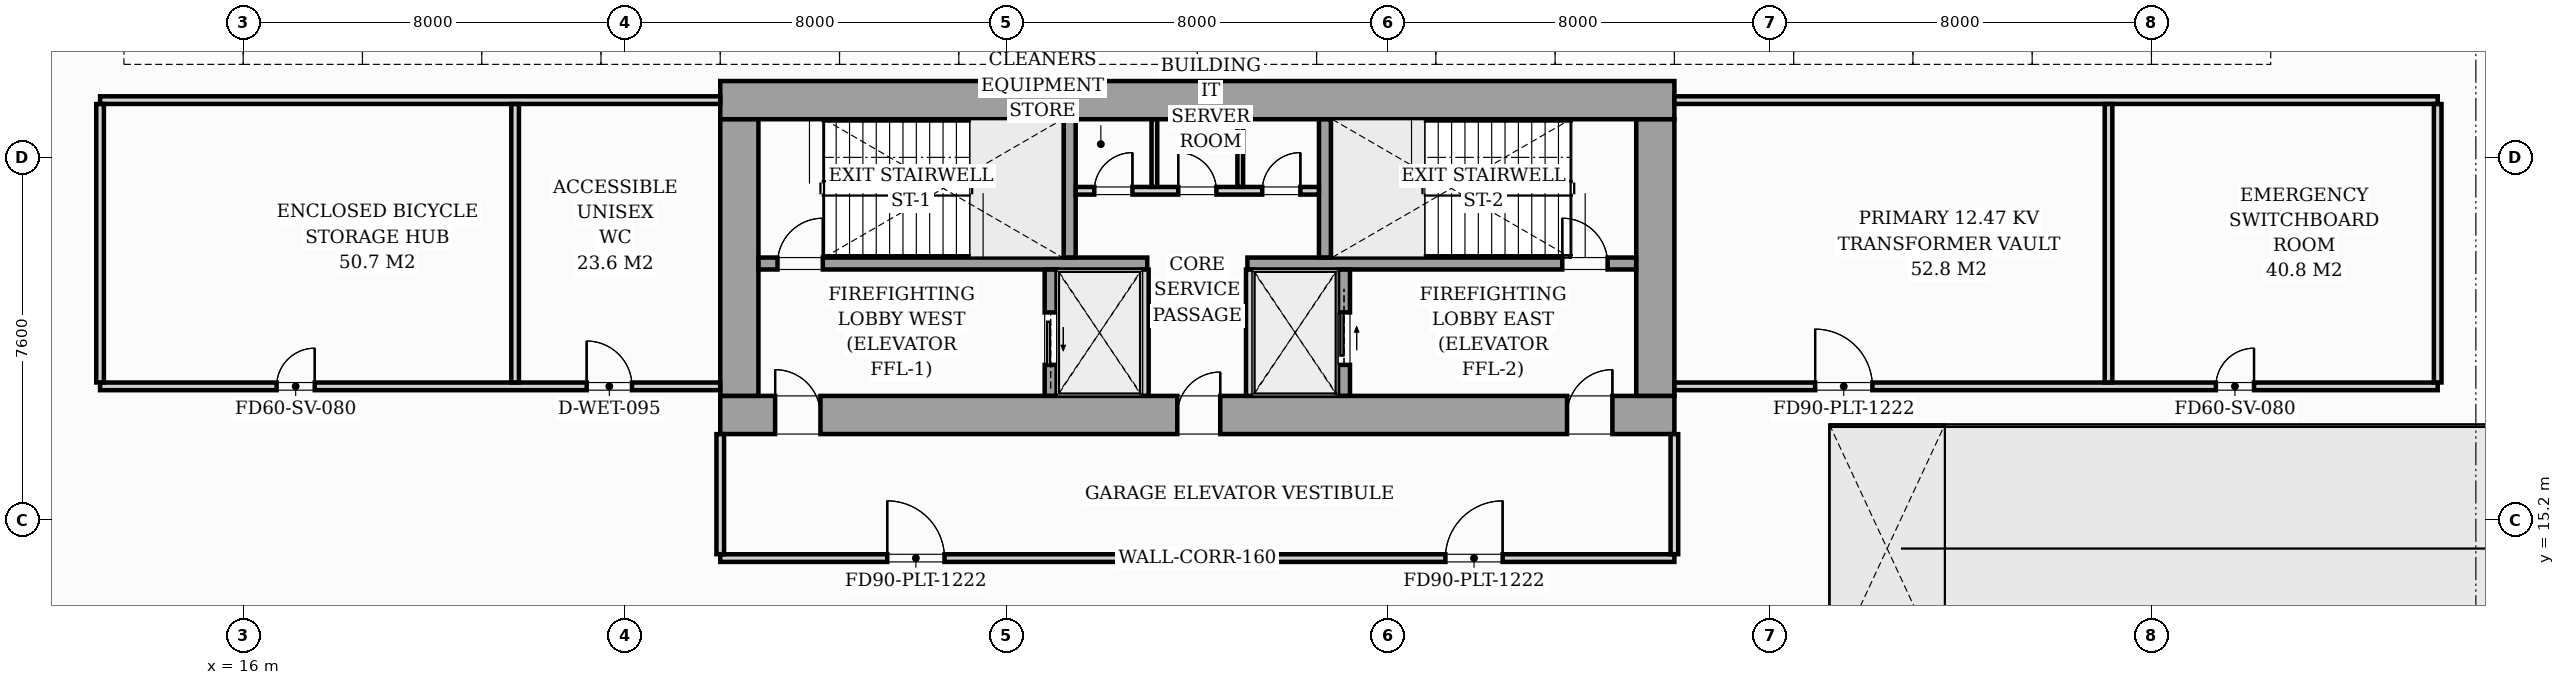
"""IFC4 building model, lengths in metres.
Left out: names, types, materials, properties, quantities, classifications, styles, units other than length and angle.
Written with IfcOpenShell. Run it as: python <this file> out.ifc"""

import sys

from ifc_helpers import new_model, si_unit, direction, frame, frame_2d, origin, origin_2d, place, context, subcontext, project, spatial, rectangle, i_section, extrude, source, transform, mapped, element, fill, save


model = new_model("IFC4")
c1 = context("Model", 3, precision=1e-05, world=origin(), true_north=direction((0.0, 1.0)))
c2 = subcontext(c1, "Body", "Model", "MODEL_VIEW")
j1 = project(units=[si_unit("LENGTHUNIT", "METRE"), si_unit("PLANEANGLEUNIT", "RADIAN")], contexts=[c1])
p1 = place(None, origin())
s1 = spatial("IfcSite", under=j1, at=p1, CompositionType="ELEMENT")
p2 = place(p1, origin())
s2 = spatial("IfcBuilding", under=s1, at=p2, CompositionType="ELEMENT")
p3 = place(p2, frame((0.0, 0.0, -4.2)))
s3 = spatial("IfcBuildingStorey", under=s2, at=p3, CompositionType="ELEMENT", Elevation=-4.2)
m1 = source(origin(), c2, "Body", "SweptSolid", [
    extrude(i_section(OverallWidth=0.437, OverallDepth=0.514, WebThickness=0.061, FlangeThickness=0.097, FilletRadius=0.018, at=origin_2d()), origin(), (0.0, 0.0, 1.0), 4.196),
])
for number, where, z_axis, x_axis in (
    (1, (26.4, 17.4, 0.002), (0.0, 0.0, 1.0), (1.0, 0.0, 0.0)),
    (2, (33.12, 17.4, 0.002), (0.0, 0.0, 1.0), (1.0, 0.0, 0.0)),
    (3, (38.88, 17.4, 0.002), (0.0, 0.0, 1.0), (1.0, 0.0, 0.0)),
    (4, (45.6, 17.4, 0.002), (0.0, 0.0, 1.0), (1.0, 0.0, 0.0)),
    (5, (26.4, 24.0, 0.002), (0.0, 0.0, 1.0), (1.0, 0.0, 0.0)),
    (6, (33.12, 24.0, 0.002), (0.0, 0.0, 1.0), (1.0, 0.0, 0.0)),
    (7, (38.88, 24.0, 0.002), (0.0, 0.0, 1.0), (1.0, 0.0, 0.0)),
    (8, (45.6, 24.0, 0.002), (0.0, 0.0, 1.0), (1.0, 0.0, 0.0)),
):
    element("IfcColumn", number, at=place(p3, frame(where, z_axis=z_axis, x_axis=x_axis)), inside=s3, PredefinedType="PILASTER", context=c2, shape_type="MappedRepresentation", body=[
        mapped(m1, transform((0.0, 0.0, 0.0), scale=1.0)),
    ])
p4 = place(p3, frame((26.0, 17.4, 0.0), z_axis=(0.0, 0.0, 1.0), x_axis=(1.0, 0.0, 0.0)))
e9 = element("IfcWall", 9, at=p4, inside=s3, PredefinedType="SHEAR", context=c2, shape_type="SweptSolid", body=[
    extrude(rectangle(XDim=20.0, YDim=0.8, at=frame_2d((10.0, 0.0))), origin(), (0.0, 0.0, 1.0), 4.2),
])
p5 = place(p4, frame((1.15, 0.0, 0.0)))
e10 = element("IfcOpeningElement", 10, at=p5, cuts=e9, PredefinedType="OPENING", context=c2, shape_type="SweptSolid", body=[
    extrude(rectangle(XDim=0.95, YDim=2.06, at=frame_2d((0.475, 1.03))), frame((0.0, 0.41, 0.0), z_axis=(0.0, -1.0, 0.0), x_axis=(1.0, 0.0, 0.0)), (0.0, 0.0, 1.0), 0.82),
])
p6 = place(p4, frame((9.58, 0.0, 0.0)))
e11 = element("IfcOpeningElement", 11, at=p6, cuts=e9, PredefinedType="OPENING", context=c2, shape_type="SweptSolid", body=[
    extrude(rectangle(XDim=0.9, YDim=2.06, at=frame_2d((0.45, 1.03))), frame((0.0, 0.41, 0.0), z_axis=(0.0, -1.0, 0.0), x_axis=(1.0, 0.0, 0.0)), (0.0, 0.0, 1.0), 0.82),
])
p7 = place(p4, frame((17.75, 0.0, 0.0)))
e12 = element("IfcOpeningElement", 12, at=p7, cuts=e9, PredefinedType="OPENING", context=c2, shape_type="SweptSolid", body=[
    extrude(rectangle(XDim=0.95, YDim=2.06, at=frame_2d((0.475, 1.03))), frame((0.0, 0.41, 0.0), z_axis=(0.0, -1.0, 0.0), x_axis=(1.0, 0.0, 0.0)), (0.0, 0.0, 1.0), 0.82),
])
p8 = place(p3, frame((26.0, 24.0, 0.0), z_axis=(0.0, 0.0, 1.0), x_axis=(1.0, 0.0, 0.0)))
e13 = element("IfcWall", 13, at=p8, inside=s3, PredefinedType="SHEAR", context=c2, shape_type="SweptSolid", body=[
    extrude(rectangle(XDim=20.0, YDim=0.8, at=frame_2d((10.0, 0.0))), origin(), (0.0, 0.0, 1.0), 4.2),
])
for number, where, z_axis, x_axis in (
    (14, (26.4, 17.802, 0.0), (0.0, 0.0, 1.0), (0.0, 1.0, 0.0)),
    (15, (45.6, 17.802, 0.0), (0.0, 0.0, 1.0), (0.0, 1.0, 0.0)),
):
    element("IfcWall", number, at=place(p3, frame(where, z_axis=z_axis, x_axis=x_axis)), inside=s3, PredefinedType="SHEAR", context=c2, shape_type="SweptSolid", body=[
        extrude(rectangle(XDim=5.796, YDim=0.8, at=frame_2d((2.898, 0.0))), origin(), (0.0, 0.0, 1.0), 4.2),
    ])
p9 = place(p3, frame((26.802, 20.575, 0.0), z_axis=(0.0, 0.0, 1.0), x_axis=(1.0, 0.0, 0.0)))
e16 = element("IfcWall", 16, at=p9, inside=s3, PredefinedType="SOLIDWALL", context=c2, shape_type="SweptSolid", body=[
    extrude(rectangle(XDim=8.148, YDim=0.25, at=frame_2d((4.074, 0.0))), origin(), (0.0, 0.0, 1.0), 4.2),
])
p10 = place(p9, frame((0.398, 0.0, 0.0)))
e17 = element("IfcOpeningElement", 17, at=p10, cuts=e16, PredefinedType="OPENING", context=c2, shape_type="SweptSolid", body=[
    extrude(rectangle(XDim=0.95, YDim=2.06, at=frame_2d((0.475, 1.03))), frame((0.0, 0.135, 0.0), z_axis=(0.0, -1.0, 0.0), x_axis=(1.0, 0.0, 0.0)), (0.0, 0.0, 1.0), 0.27),
])
p11 = place(p3, frame((37.05, 20.575, 0.0), z_axis=(0.0, 0.0, 1.0), x_axis=(1.0, 0.0, 0.0)))
e18 = element("IfcWall", 18, at=p11, inside=s3, PredefinedType="SOLIDWALL", context=c2, shape_type="SweptSolid", body=[
    extrude(rectangle(XDim=8.148, YDim=0.25, at=frame_2d((4.074, 0.0))), origin(), (0.0, 0.0, 1.0), 4.2),
])
p12 = place(p11, frame((6.6, 0.0, 0.0)))
e19 = element("IfcOpeningElement", 19, at=p12, cuts=e18, PredefinedType="OPENING", context=c2, shape_type="SweptSolid", body=[
    extrude(rectangle(XDim=0.95, YDim=2.06, at=frame_2d((0.475, 1.03))), frame((0.0, 0.135, 0.0), z_axis=(0.0, -1.0, 0.0), x_axis=(1.0, 0.0, 0.0)), (0.0, 0.0, 1.0), 0.27),
])
for number, where, z_axis, x_axis in (
    (20, (33.325, 20.702, 0.0), (0.0, 0.0, 1.0), (0.0, 1.0, 0.0)),
    (21, (38.675, 20.702, 0.0), (0.0, 0.0, 1.0), (0.0, 1.0, 0.0)),
):
    element("IfcWall", number, at=place(p3, frame(where, z_axis=z_axis, x_axis=x_axis)), inside=s3, PredefinedType="SOLIDWALL", context=c2, shape_type="SweptSolid", body=[
        extrude(rectangle(XDim=2.896, YDim=0.25, at=frame_2d((1.448, 0.0))), origin(), (0.0, 0.0, 1.0), 4.2),
    ])
p13 = place(p3, frame((32.925, 17.802, 0.0), z_axis=(0.0, 0.0, 1.0), x_axis=(0.0, 1.0, 0.0)))
e22 = element("IfcWall", 22, at=p13, inside=s3, PredefinedType="SOLIDWALL", context=c2, shape_type="SweptSolid", body=[
    extrude(rectangle(XDim=2.646, YDim=0.25, at=frame_2d((1.323, 0.0))), origin(), (0.0, 0.0, 1.0), 4.2),
])
p14 = place(p13, frame((0.648, 0.0, 0.0)))
e23 = element("IfcOpeningElement", 23, at=p14, cuts=e22, PredefinedType="OPENING", context=c2, shape_type="SweptSolid", body=[
    extrude(rectangle(XDim=1.1, YDim=2.08, at=frame_2d((0.55, 1.04))), frame((0.0, 0.135, 0.0), z_axis=(0.0, -1.0, 0.0), x_axis=(1.0, 0.0, 0.0)), (0.0, 0.0, 1.0), 0.27),
])
for number, where, z_axis, x_axis in (
    (24, (34.9, 17.802, 0.0), (0.0, 0.0, 1.0), (0.0, 1.0, 0.0)),
    (25, (37.1, 17.802, 0.0), (0.0, 0.0, 1.0), (0.0, 1.0, 0.0)),
):
    element("IfcWall", number, at=place(p3, frame(where, z_axis=z_axis, x_axis=x_axis)), inside=s3, PredefinedType="PARTITIONING", context=c2, shape_type="SweptSolid", body=[
        extrude(rectangle(XDim=2.646, YDim=0.16, at=frame_2d((1.323, 0.0))), origin(), (0.0, 0.0, 1.0), 3.9),
    ])
p15 = place(p3, frame((39.075, 17.802, 0.0), z_axis=(0.0, 0.0, 1.0), x_axis=(0.0, 1.0, 0.0)))
e26 = element("IfcWall", 26, at=p15, inside=s3, PredefinedType="SOLIDWALL", context=c2, shape_type="SweptSolid", body=[
    extrude(rectangle(XDim=2.646, YDim=0.25, at=frame_2d((1.323, 0.0))), origin(), (0.0, 0.0, 1.0), 4.2),
])
p16 = place(p15, frame((0.648, 0.0, 0.0)))
e27 = element("IfcOpeningElement", 27, at=p16, cuts=e26, PredefinedType="OPENING", context=c2, shape_type="SweptSolid", body=[
    extrude(rectangle(XDim=1.1, YDim=2.08, at=frame_2d((0.55, 1.04))), frame((0.0, 0.135, 0.0), z_axis=(0.0, -1.0, 0.0), x_axis=(1.0, 0.0, 0.0)), (0.0, 0.0, 1.0), 0.27),
])
p17 = place(p3, frame((33.452, 22.1, 0.0), z_axis=(0.0, 0.0, 1.0), x_axis=(1.0, 0.0, 0.0)))
e28 = element("IfcWall", 28, at=p17, inside=s3, PredefinedType="PARTITIONING", context=c2, shape_type="SweptSolid", body=[
    extrude(rectangle(XDim=5.096, YDim=0.16, at=frame_2d((2.548, 0.0))), origin(), (0.0, 0.0, 1.0), 3.9),
])
p18 = place(p17, frame((0.388, 0.0, 0.0)))
e29 = element("IfcOpeningElement", 29, at=p18, cuts=e28, PredefinedType="OPENING", context=c2, shape_type="SweptSolid", body=[
    extrude(rectangle(XDim=0.8, YDim=2.05, at=frame_2d((0.4, 1.025))), frame((0.0, 0.09, 0.0), z_axis=(0.0, -1.0, 0.0), x_axis=(1.0, 0.0, 0.0)), (0.0, 0.0, 1.0), 0.18),
])
p19 = place(p17, frame((2.148, 0.0, 0.0)))
e30 = element("IfcOpeningElement", 30, at=p19, cuts=e28, PredefinedType="OPENING", context=c2, shape_type="SweptSolid", body=[
    extrude(rectangle(XDim=0.8, YDim=2.05, at=frame_2d((0.4, 1.025))), frame((0.0, 0.09, 0.0), z_axis=(0.0, -1.0, 0.0), x_axis=(1.0, 0.0, 0.0)), (0.0, 0.0, 1.0), 0.18),
])
p20 = place(p17, frame((3.908, 0.0, 0.0)))
e31 = element("IfcOpeningElement", 31, at=p20, cuts=e28, PredefinedType="OPENING", context=c2, shape_type="SweptSolid", body=[
    extrude(rectangle(XDim=0.8, YDim=2.05, at=frame_2d((0.4, 1.025))), frame((0.0, 0.09, 0.0), z_axis=(0.0, -1.0, 0.0), x_axis=(1.0, 0.0, 0.0)), (0.0, 0.0, 1.0), 0.18),
])
for number, where, z_axis, x_axis in (
    (32, (35.1, 22.182, 0.0), (0.0, 0.0, 1.0), (0.0, 1.0, 0.0)),
    (33, (36.9, 22.182, 0.0), (0.0, 0.0, 1.0), (0.0, 1.0, 0.0)),
):
    element("IfcWall", number, at=place(p3, frame(where, z_axis=z_axis, x_axis=x_axis)), inside=s3, PredefinedType="PARTITIONING", context=c2, shape_type="SweptSolid", body=[
        extrude(rectangle(XDim=1.416, YDim=0.12, at=frame_2d((0.708, 0.0))), origin(), (0.0, 0.0, 1.0), 3.9),
    ])
p21 = place(p3, frame((26.0, 14.4, 0.0), z_axis=(0.0, 0.0, 1.0), x_axis=(1.0, 0.0, 0.0)))
e34 = element("IfcWall", 34, at=p21, inside=s3, PredefinedType="PARTITIONING", context=c2, shape_type="SweptSolid", body=[
    extrude(rectangle(XDim=20.0, YDim=0.16, at=frame_2d((10.0, 0.0))), origin(), (0.0, 0.0, 1.0), 3.9),
])
p22 = place(p21, frame((3.5, 0.0, 0.0)))
e35 = element("IfcOpeningElement", 35, at=p22, cuts=e34, PredefinedType="OPENING", context=c2, shape_type="SweptSolid", body=[
    extrude(rectangle(XDim=1.2, YDim=2.08, at=frame_2d((0.6, 1.04))), frame((0.0, 0.09, 0.0), z_axis=(0.0, -1.0, 0.0), x_axis=(1.0, 0.0, 0.0)), (0.0, 0.0, 1.0), 0.18),
])
p23 = place(p21, frame((15.2, 0.0, 0.0)))
e36 = element("IfcOpeningElement", 36, at=p23, cuts=e34, PredefinedType="OPENING", context=c2, shape_type="SweptSolid", body=[
    extrude(rectangle(XDim=1.2, YDim=2.08, at=frame_2d((0.6, 1.04))), frame((0.0, 0.09, 0.0), z_axis=(0.0, -1.0, 0.0), x_axis=(1.0, 0.0, 0.0)), (0.0, 0.0, 1.0), 0.18),
])
for number, where, z_axis, x_axis in (
    (37, (26.0, 14.482, 0.0), (0.0, 0.0, 1.0), (0.0, 1.0, 0.0)),
    (38, (46.0, 14.482, 0.0), (0.0, 0.0, 1.0), (0.0, 1.0, 0.0)),
):
    element("IfcWall", number, at=place(p3, frame(where, z_axis=z_axis, x_axis=x_axis)), inside=s3, PredefinedType="PARTITIONING", context=c2, shape_type="SweptSolid", body=[
        extrude(rectangle(XDim=2.516, YDim=0.16, at=frame_2d((1.258, 0.0))), origin(), (0.0, 0.0, 1.0), 3.9),
    ])
p24 = place(p3, frame((13.0, 18.0, 0.0), z_axis=(0.0, 0.0, 1.0), x_axis=(1.0, 0.0, 0.0)))
e39 = element("IfcWall", 39, at=p24, inside=s3, PredefinedType="PARTITIONING", context=c2, shape_type="SweptSolid", body=[
    extrude(rectangle(XDim=12.998, YDim=0.16, at=frame_2d((6.499, 0.0))), origin(), (0.0, 0.0, 1.0), 2.856),
])
p25 = place(p24, frame((10.2, 0.0, 0.0)))
e40 = element("IfcOpeningElement", 40, at=p25, cuts=e39, PredefinedType="OPENING", context=c2, shape_type="SweptSolid", body=[
    extrude(rectangle(XDim=0.95, YDim=2.1, at=frame_2d((0.475, 1.05))), frame((0.0, 0.09, 0.0), z_axis=(0.0, -1.0, 0.0), x_axis=(1.0, 0.0, 0.0)), (0.0, 0.0, 1.0), 0.18),
])
p26 = place(p24, frame((3.7, 0.0, 0.0)))
e41 = element("IfcOpeningElement", 41, at=p26, cuts=e39, PredefinedType="OPENING", context=c2, shape_type="SweptSolid", body=[
    extrude(rectangle(XDim=0.8, YDim=2.05, at=frame_2d((0.4, 1.025))), frame((0.0, 0.09, 0.0), z_axis=(0.0, -1.0, 0.0), x_axis=(1.0, 0.0, 0.0)), (0.0, 0.0, 1.0), 0.18),
])
p27 = place(p3, frame((13.0, 24.0, 0.0), z_axis=(0.0, 0.0, 1.0), x_axis=(1.0, 0.0, 0.0)))
e42 = element("IfcWall", 42, at=p27, inside=s3, PredefinedType="PARTITIONING", context=c2, shape_type="SweptSolid", body=[
    extrude(rectangle(XDim=13.0, YDim=0.16, at=frame_2d((6.5, 0.0))), origin(), (0.0, 0.0, 1.0), 3.9),
])
for number, where, z_axis, x_axis in (
    (43, (13.0, 18.082, 0.0), (0.0, 0.0, 1.0), (0.0, 1.0, 0.0)),
    (44, (21.7, 18.082, 0.0), (0.0, 0.0, 1.0), (0.0, 1.0, 0.0)),
):
    element("IfcWall", number, at=place(p3, frame(where, z_axis=z_axis, x_axis=x_axis)), inside=s3, PredefinedType="PARTITIONING", context=c2, shape_type="SweptSolid", body=[
        extrude(rectangle(XDim=5.836, YDim=0.16, at=frame_2d((2.918, 0.0))), origin(), (0.0, 0.0, 1.0), 3.9),
    ])
p28 = place(p3, frame((46.002, 18.0, 0.0), z_axis=(0.0, 0.0, 1.0), x_axis=(1.0, 0.0, 0.0)))
e45 = element("IfcWall", 45, at=p28, inside=s3, PredefinedType="PARTITIONING", context=c2, shape_type="SweptSolid", body=[
    extrude(rectangle(XDim=15.998, YDim=0.16, at=frame_2d((7.999, 0.0))), origin(), (0.0, 0.0, 1.0), 2.856),
])
p29 = place(p28, frame((2.948, 0.0, 0.0)))
e46 = element("IfcOpeningElement", 46, at=p29, cuts=e45, PredefinedType="OPENING", context=c2, shape_type="SweptSolid", body=[
    extrude(rectangle(XDim=1.2, YDim=2.08, at=frame_2d((0.6, 1.04))), frame((0.0, 0.09, 0.0), z_axis=(0.0, -1.0, 0.0), x_axis=(1.0, 0.0, 0.0)), (0.0, 0.0, 1.0), 0.18),
])
p30 = place(p28, frame((11.348, 0.0, 0.0)))
e47 = element("IfcOpeningElement", 47, at=p30, cuts=e45, PredefinedType="OPENING", context=c2, shape_type="SweptSolid", body=[
    extrude(rectangle(XDim=0.8, YDim=2.05, at=frame_2d((0.4, 1.025))), frame((0.0, 0.09, 0.0), z_axis=(0.0, -1.0, 0.0), x_axis=(1.0, 0.0, 0.0)), (0.0, 0.0, 1.0), 0.18),
])
p31 = place(p3, frame((46.0, 24.0, 0.0), z_axis=(0.0, 0.0, 1.0), x_axis=(1.0, 0.0, 0.0)))
e48 = element("IfcWall", 48, at=p31, inside=s3, PredefinedType="PARTITIONING", context=c2, shape_type="SweptSolid", body=[
    extrude(rectangle(XDim=16.0, YDim=0.16, at=frame_2d((8.0, 0.0))), origin(), (0.0, 0.0, 1.0), 3.9),
])
for number, where, z_axis, x_axis in (
    (49, (62.0, 18.082, 0.0), (0.0, 0.0, 1.0), (0.0, 1.0, 0.0)),
    (50, (55.1, 18.082, 0.0), (0.0, 0.0, 1.0), (0.0, 1.0, 0.0)),
):
    element("IfcWall", number, at=place(p3, frame(where, z_axis=z_axis, x_axis=x_axis)), inside=s3, PredefinedType="PARTITIONING", context=c2, shape_type="SweptSolid", body=[
        extrude(rectangle(XDim=5.836, YDim=0.16, at=frame_2d((2.918, 0.0))), origin(), (0.0, 0.0, 1.0), 3.9),
    ])
m2 = source(origin(), c2, "Body", "SweptSolid", [
    extrude(rectangle(XDim=0.95, YDim=2.06, at=frame_2d((0.475, 1.03))), frame((0.0, 0.025, 0.0), z_axis=(0.0, -1.0, 0.0), x_axis=(1.0, 0.0, 0.0)), (0.0, 0.0, 1.0), 0.05),
])
p32 = place(p5, origin())
e51 = element("IfcDoor", 51, at=p32, inside=s3, OperationType="SINGLE_SWING_LEFT", PredefinedType="DOOR", context=c2, shape_type="MappedRepresentation", body=[
    mapped(m2, transform((0.0, 0.0, 0.0), scale=1.0)),
])
fill(e10, e51)
m3 = source(origin(), c2, "Body", "SweptSolid", [
    extrude(rectangle(XDim=0.9, YDim=2.06, at=frame_2d((0.45, 1.03))), frame((0.0, 0.025, 0.0), z_axis=(0.0, -1.0, 0.0), x_axis=(1.0, 0.0, 0.0)), (0.0, 0.0, 1.0), 0.05),
])
p33 = place(p6, origin())
e52 = element("IfcDoor", 52, at=p33, inside=s3, OperationType="SINGLE_SWING_RIGHT", PredefinedType="DOOR", context=c2, shape_type="MappedRepresentation", body=[
    mapped(m3, transform((0.0, 0.0, 0.0), scale=1.0)),
])
fill(e11, e52)
p34 = place(p7, origin())
e53 = element("IfcDoor", 53, at=p34, inside=s3, OperationType="SINGLE_SWING_RIGHT", PredefinedType="DOOR", context=c2, shape_type="MappedRepresentation", body=[
    mapped(m2, transform((0.0, 0.0, 0.0), scale=1.0)),
])
fill(e12, e53)
p35 = place(p10, origin())
e54 = element("IfcDoor", 54, at=p35, inside=s3, OperationType="SINGLE_SWING_RIGHT", PredefinedType="DOOR", context=c2, shape_type="MappedRepresentation", body=[
    mapped(m2, transform((0.0, 0.0, 0.0), scale=1.0)),
])
fill(e17, e54)
p36 = place(p12, origin())
e55 = element("IfcDoor", 55, at=p36, inside=s3, OperationType="SINGLE_SWING_LEFT", PredefinedType="DOOR", context=c2, shape_type="MappedRepresentation", body=[
    mapped(m2, transform((0.0, 0.0, 0.0), scale=1.0)),
])
fill(e19, e55)
m4 = source(origin(), c2, "Body", "SweptSolid", [
    extrude(rectangle(XDim=1.1, YDim=2.08, at=frame_2d((0.55, 1.04))), frame((0.0, 0.025, 0.0), z_axis=(0.0, -1.0, 0.0), x_axis=(1.0, 0.0, 0.0)), (0.0, 0.0, 1.0), 0.05),
])
p37 = place(p14, origin())
e56 = element("IfcDoor", 56, at=p37, inside=s3, OperationType="SLIDING_TO_LEFT", PredefinedType="DOOR", context=c2, shape_type="MappedRepresentation", body=[
    mapped(m4, transform((0.0, 0.0, 0.0), scale=1.0)),
])
fill(e23, e56)
p38 = place(p16, origin())
e57 = element("IfcDoor", 57, at=p38, inside=s3, OperationType="SLIDING_TO_RIGHT", PredefinedType="DOOR", context=c2, shape_type="MappedRepresentation", body=[
    mapped(m4, transform((0.0, 0.0, 0.0), scale=1.0)),
])
fill(e27, e57)
m5 = source(origin(), c2, "Body", "SweptSolid", [
    extrude(rectangle(XDim=0.8, YDim=2.05, at=frame_2d((0.4, 1.025))), frame((0.0, 0.025, 0.0), z_axis=(0.0, -1.0, 0.0), x_axis=(1.0, 0.0, 0.0)), (0.0, 0.0, 1.0), 0.05),
])
p39 = place(p18, origin())
e58 = element("IfcDoor", 58, at=p39, inside=s3, OperationType="SINGLE_SWING_RIGHT", PredefinedType="DOOR", context=c2, shape_type="MappedRepresentation", body=[
    mapped(m5, transform((0.0, 0.0, 0.0), scale=1.0)),
])
fill(e29, e58)
p40 = place(p19, origin())
e59 = element("IfcDoor", 59, at=p40, inside=s3, OperationType="SINGLE_SWING_LEFT", PredefinedType="DOOR", context=c2, shape_type="MappedRepresentation", body=[
    mapped(m5, transform((0.0, 0.0, 0.0), scale=1.0)),
])
fill(e30, e59)
p41 = place(p20, origin())
e60 = element("IfcDoor", 60, at=p41, inside=s3, OperationType="SINGLE_SWING_RIGHT", PredefinedType="DOOR", context=c2, shape_type="MappedRepresentation", body=[
    mapped(m5, transform((0.0, 0.0, 0.0), scale=1.0)),
])
fill(e31, e60)
m6 = source(origin(), c2, "Body", "SweptSolid", [
    extrude(rectangle(XDim=1.2, YDim=2.08, at=frame_2d((0.6, 1.04))), frame((0.0, 0.025, 0.0), z_axis=(0.0, -1.0, 0.0), x_axis=(1.0, 0.0, 0.0)), (0.0, 0.0, 1.0), 0.05),
])
p42 = place(p22, origin())
e61 = element("IfcDoor", 61, at=p42, inside=s3, OperationType="SINGLE_SWING_LEFT", PredefinedType="DOOR", context=c2, shape_type="MappedRepresentation", body=[
    mapped(m6, transform((0.0, 0.0, 0.0), scale=1.0)),
])
fill(e35, e61)
p43 = place(p23, origin())
e62 = element("IfcDoor", 62, at=p43, inside=s3, OperationType="SINGLE_SWING_RIGHT", PredefinedType="DOOR", context=c2, shape_type="MappedRepresentation", body=[
    mapped(m6, transform((0.0, 0.0, 0.0), scale=1.0)),
])
fill(e36, e62)
m7 = source(origin(), c2, "Body", "SweptSolid", [
    extrude(rectangle(XDim=0.95, YDim=2.1, at=frame_2d((0.475, 1.05))), frame((0.0, 0.025, 0.0), z_axis=(0.0, -1.0, 0.0), x_axis=(1.0, 0.0, 0.0)), (0.0, 0.0, 1.0), 0.05),
])
p44 = place(p25, origin())
e63 = element("IfcDoor", 63, at=p44, inside=s3, OperationType="SINGLE_SWING_LEFT", PredefinedType="DOOR", context=c2, shape_type="MappedRepresentation", body=[
    mapped(m7, transform((0.0, 0.0, 0.0), scale=1.0)),
])
fill(e40, e63)
p45 = place(p26, origin())
e64 = element("IfcDoor", 64, at=p45, inside=s3, OperationType="SINGLE_SWING_RIGHT", PredefinedType="DOOR", context=c2, shape_type="MappedRepresentation", body=[
    mapped(m5, transform((0.0, 0.0, 0.0), scale=1.0)),
])
fill(e41, e64)
p46 = place(p29, origin())
e65 = element("IfcDoor", 65, at=p46, inside=s3, OperationType="SINGLE_SWING_LEFT", PredefinedType="DOOR", context=c2, shape_type="MappedRepresentation", body=[
    mapped(m6, transform((0.0, 0.0, 0.0), scale=1.0)),
])
fill(e46, e65)
p47 = place(p30, origin())
e66 = element("IfcDoor", 66, at=p47, inside=s3, OperationType="SINGLE_SWING_RIGHT", PredefinedType="DOOR", context=c2, shape_type="MappedRepresentation", body=[
    mapped(m5, transform((0.0, 0.0, 0.0), scale=1.0)),
])
fill(e47, e66)
save(model, sys.argv[1])
